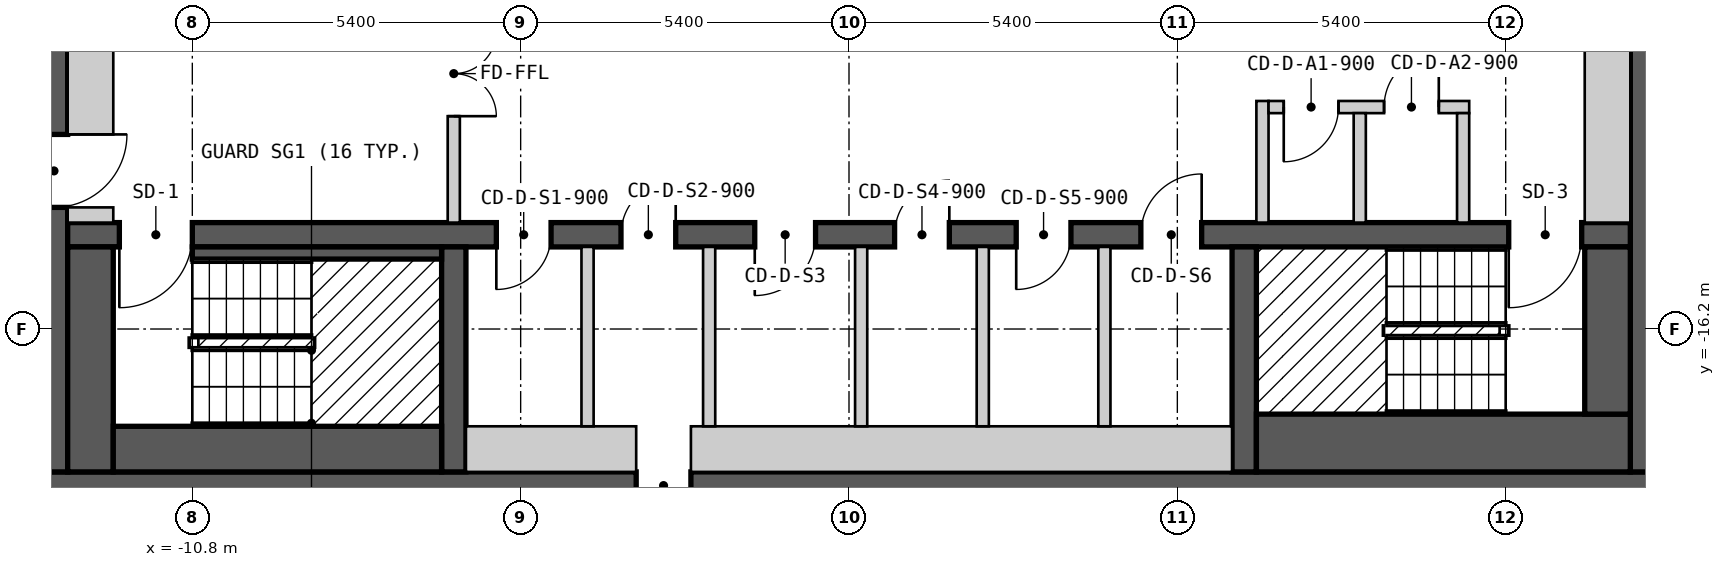
"""IFC4 building model, lengths in metres.
Left out: names, types, materials, properties, quantities, classifications, styles, units other than length and angle.
Written with IfcOpenShell. Run it as: python <this file> out.ifc"""

import sys

from ifc_helpers import new_model, si_unit, direction, frame, frame_2d, origin, place, context, subcontext, project, spatial, polyline, rectangle, outline, extrude, element, fill, save


model = new_model("IFC4")
c1 = context("Model", 3, precision=1e-05, world=origin(), true_north=direction((0.0, 1.0)))
c2 = subcontext(c1, "Body", "Model", "MODEL_VIEW")
j1 = project(units=[si_unit("LENGTHUNIT", "METRE"), si_unit("PLANEANGLEUNIT", "RADIAN")], contexts=[c1])
p1 = place(None, origin())
s1 = spatial("IfcSite", under=j1, at=p1, CompositionType="ELEMENT")
p2 = place(p1, origin())
s2 = spatial("IfcBuilding", under=s1, at=p2, CompositionType="ELEMENT")
p3 = place(p2, frame((0.0, 0.0, 202.8)))
s3 = spatial("IfcBuildingStorey", under=s2, at=p3, CompositionType="ELEMENT", Elevation=202.8)
p4 = place(p3, frame((-13.3, -18.775, 0.0), z_axis=(0.0, 0.0, 1.0), x_axis=(1.0, 0.0, 0.0)))
e1 = element("IfcWall", 1, at=p4, inside=s3, PredefinedType="SHEAR", context=c2, shape_type="SweptSolid", body=[
    extrude(rectangle(XDim=26.6, YDim=0.45, at=frame_2d((13.3, 0.0))), origin(), (0.0, 0.0, 1.0), 2.7),
])
p5 = place(p4, frame((9.8, 0.0, 0.0)))
e2 = element("IfcOpeningElement", 2, at=p5, cuts=e1, PredefinedType="OPENING", context=c2, shape_type="SweptSolid", body=[
    extrude(rectangle(XDim=0.9, YDim=2.1, at=frame_2d((0.45, 1.05))), frame((0.0, 0.235, 0.0), z_axis=(0.0, -1.0, 0.0), x_axis=(1.0, 0.0, 0.0)), (0.0, 0.0, 1.0), 0.47),
])
p6 = place(p3, frame((-13.075, -18.55, 0.0), z_axis=(0.0, 0.0, 1.0), x_axis=(0.0, 1.0, 0.0)))
e3 = element("IfcWall", 3, at=p6, inside=s3, PredefinedType="SHEAR", context=c2, shape_type="SweptSolid", body=[
    extrude(rectangle(XDim=13.1, YDim=0.45, at=frame_2d((6.55, 0.0))), origin(), (0.0, 0.0, 1.0), 2.7),
])
p7 = place(p6, frame((4.35, 0.0, 0.0)))
e4 = element("IfcOpeningElement", 4, at=p7, cuts=e3, PredefinedType="OPENING", context=c2, shape_type="SweptSolid", body=[
    extrude(rectangle(XDim=1.2, YDim=2.1, at=frame_2d((0.6, 1.05))), frame((0.0, 0.235, 0.0), z_axis=(0.0, -1.0, 0.0), x_axis=(1.0, 0.0, 0.0)), (0.0, 0.0, 1.0), 0.47),
])
p8 = place(p3, frame((13.075, -18.55, 0.0), z_axis=(0.0, 0.0, 1.0), x_axis=(0.0, 1.0, 0.0)))
e5 = element("IfcWall", 5, at=p8, inside=s3, PredefinedType="SHEAR", context=c2, shape_type="SweptSolid", body=[
    extrude(rectangle(XDim=13.1, YDim=0.45, at=frame_2d((6.55, 0.0))), origin(), (0.0, 0.0, 1.0), 2.7),
])
p9 = place(p3, frame((-12.85, -14.65, 0.0), z_axis=(0.0, 0.0, 1.0), x_axis=(1.0, 0.0, 0.0)))
e6 = element("IfcWall", 6, at=p9, inside=s3, PredefinedType="SHEAR", context=c2, shape_type="SweptSolid", body=[
    extrude(rectangle(XDim=25.7, YDim=0.4, at=frame_2d((12.85, 0.0))), origin(), (0.0, 0.0, 1.0), 2.7),
])
p10 = place(p9, frame((2.05, 0.0, 0.0), z_axis=(0.0, 0.0, 1.0), x_axis=(-1.0, 0.0, 0.0)))
e7 = element("IfcOpeningElement", 7, at=p10, cuts=e6, PredefinedType="OPENING", context=c2, shape_type="SweptSolid", body=[
    extrude(rectangle(XDim=1.2, YDim=2.1, at=frame_2d((0.6, 1.05))), frame((0.0, 0.21, 0.0), z_axis=(0.0, -1.0, 0.0), x_axis=(1.0, 0.0, 0.0)), (0.0, 0.0, 1.0), 0.42),
])
p11 = place(p9, frame((24.9, 0.0, 0.0), z_axis=(0.0, 0.0, 1.0), x_axis=(-1.0, 0.0, 0.0)))
e8 = element("IfcOpeningElement", 8, at=p11, cuts=e6, PredefinedType="OPENING", context=c2, shape_type="SweptSolid", body=[
    extrude(rectangle(XDim=1.2, YDim=2.1, at=frame_2d((0.6, 1.05))), frame((0.0, 0.21, 0.0), z_axis=(0.0, -1.0, 0.0), x_axis=(1.0, 0.0, 0.0)), (0.0, 0.0, 1.0), 0.42),
])
p12 = place(p9, frame((7.95, 0.0, 0.0), z_axis=(0.0, 0.0, 1.0), x_axis=(-1.0, 0.0, 0.0)))
e9 = element("IfcOpeningElement", 9, at=p12, cuts=e6, PredefinedType="OPENING", context=c2, shape_type="SweptSolid", body=[
    extrude(rectangle(XDim=0.9, YDim=2.1, at=frame_2d((0.45, 1.05))), frame((0.0, 0.21, 0.0), z_axis=(0.0, -1.0, 0.0), x_axis=(1.0, 0.0, 0.0)), (0.0, 0.0, 1.0), 0.42),
])
p13 = place(p9, frame((10.0, 0.0, 0.0), z_axis=(0.0, 0.0, 1.0), x_axis=(-1.0, 0.0, 0.0)))
e10 = element("IfcOpeningElement", 10, at=p13, cuts=e6, PredefinedType="OPENING", context=c2, shape_type="SweptSolid", body=[
    extrude(rectangle(XDim=0.9, YDim=2.1, at=frame_2d((0.45, 1.05))), frame((0.0, 0.21, 0.0), z_axis=(0.0, -1.0, 0.0), x_axis=(1.0, 0.0, 0.0)), (0.0, 0.0, 1.0), 0.42),
])
p14 = place(p9, frame((12.3, 0.0, 0.0), z_axis=(0.0, 0.0, 1.0), x_axis=(-1.0, 0.0, 0.0)))
e11 = element("IfcOpeningElement", 11, at=p14, cuts=e6, PredefinedType="OPENING", context=c2, shape_type="SweptSolid", body=[
    extrude(rectangle(XDim=1.0, YDim=2.1, at=frame_2d((0.5, 1.05))), frame((0.0, 0.21, 0.0), z_axis=(0.0, -1.0, 0.0), x_axis=(1.0, 0.0, 0.0)), (0.0, 0.0, 1.0), 0.42),
])
p15 = place(p9, frame((14.5, 0.0, 0.0), z_axis=(0.0, 0.0, 1.0), x_axis=(-1.0, 0.0, 0.0)))
e12 = element("IfcOpeningElement", 12, at=p15, cuts=e6, PredefinedType="OPENING", context=c2, shape_type="SweptSolid", body=[
    extrude(rectangle(XDim=0.9, YDim=2.1, at=frame_2d((0.45, 1.05))), frame((0.0, 0.21, 0.0), z_axis=(0.0, -1.0, 0.0), x_axis=(1.0, 0.0, 0.0)), (0.0, 0.0, 1.0), 0.42),
])
p16 = place(p9, frame((16.5, 0.0, 0.0), z_axis=(0.0, 0.0, 1.0), x_axis=(-1.0, 0.0, 0.0)))
e13 = element("IfcOpeningElement", 13, at=p16, cuts=e6, PredefinedType="OPENING", context=c2, shape_type="SweptSolid", body=[
    extrude(rectangle(XDim=0.9, YDim=2.1, at=frame_2d((0.45, 1.05))), frame((0.0, 0.21, 0.0), z_axis=(0.0, -1.0, 0.0), x_axis=(1.0, 0.0, 0.0)), (0.0, 0.0, 1.0), 0.42),
])
p17 = place(p9, frame((18.65, 0.0, 0.0), z_axis=(0.0, 0.0, 1.0), x_axis=(-1.0, 0.0, 0.0)))
e14 = element("IfcOpeningElement", 14, at=p17, cuts=e6, PredefinedType="OPENING", context=c2, shape_type="SweptSolid", body=[
    extrude(rectangle(XDim=1.0, YDim=2.1, at=frame_2d((0.5, 1.05))), frame((0.0, 0.21, 0.0), z_axis=(0.0, -1.0, 0.0), x_axis=(1.0, 0.0, 0.0)), (0.0, 0.0, 1.0), 0.42),
])
for number, where, z_axis, x_axis in (
    (15, (-6.5, -18.55, 0.0), (0.0, 0.0, 1.0), (0.0, 1.0, 0.0)),
    (16, (6.5, -18.55, 0.0), (0.0, 0.0, 1.0), (0.0, 1.0, 0.0)),
):
    element("IfcWall", number, at=place(p3, frame(where, z_axis=z_axis, x_axis=x_axis)), inside=s3, PredefinedType="SHEAR", context=c2, shape_type="SweptSolid", body=[
        extrude(rectangle(XDim=3.7, YDim=0.4, at=frame_2d((1.85, 0.0))), origin(), (0.0, 0.0, 1.0), 2.7),
    ])
p18 = place(p3, frame((-15.34, -18.37, 0.0), z_axis=(0.0, 0.0, 1.0), x_axis=(0.866022959057, -0.500004234368, 0.0)))
e17 = element("IfcWall", 17, at=p18, inside=s3, PredefinedType="SOLIDWALL", context=c2, shape_type="SweptSolid", body=[
    extrude(outline(polyline([(0.0, -0.15), (5.0, -0.15), (4.92, 0.15), (0.08, 0.15), (0.0, -0.15)])), origin(), (0.0, 0.0, 1.0), 2.7),
])
p19 = place(p18, frame((0.65, 0.0, 0.15)))
e18 = element("IfcOpeningElement", 18, at=p19, cuts=e17, PredefinedType="OPENING", context=c2, shape_type="SweptSolid", body=[
    extrude(rectangle(XDim=1.2, YDim=2.1, at=frame_2d((0.6, 1.05))), frame((0.0, 0.16, 0.0), z_axis=(0.0, -1.0, 0.0), x_axis=(1.0, 0.0, 0.0)), (0.0, 0.0, 1.0), 0.32),
])
p20 = place(p18, frame((3.15, 0.0, 0.15)))
e19 = element("IfcOpeningElement", 19, at=p20, cuts=e17, PredefinedType="OPENING", context=c2, shape_type="SweptSolid", body=[
    extrude(rectangle(XDim=1.2, YDim=2.1, at=frame_2d((0.6, 1.05))), frame((0.0, 0.16, 0.0), z_axis=(0.0, -1.0, 0.0), x_axis=(1.0, 0.0, 0.0)), (0.0, 0.0, 1.0), 0.32),
])
p21 = place(p3, frame((11.01, -20.87, 0.0), z_axis=(0.0, 0.0, 1.0), x_axis=(0.866022959057, 0.500004234368, 0.0)))
e20 = element("IfcWall", 20, at=p21, inside=s3, PredefinedType="SOLIDWALL", context=c2, shape_type="SweptSolid", body=[
    extrude(outline(polyline([(0.0, -0.15), (5.0, -0.15), (4.92, 0.15), (0.08, 0.15), (0.0, -0.15)])), origin(), (0.0, 0.0, 1.0), 2.7),
])
p22 = place(p21, frame((0.65, 0.0, 0.15)))
e21 = element("IfcOpeningElement", 21, at=p22, cuts=e20, PredefinedType="OPENING", context=c2, shape_type="SweptSolid", body=[
    extrude(rectangle(XDim=1.2, YDim=2.1, at=frame_2d((0.6, 1.05))), frame((0.0, 0.16, 0.0), z_axis=(0.0, -1.0, 0.0), x_axis=(1.0, 0.0, 0.0)), (0.0, 0.0, 1.0), 0.32),
])
p23 = place(p21, frame((3.149, 0.0, 0.15)))
e22 = element("IfcOpeningElement", 22, at=p23, cuts=e20, PredefinedType="OPENING", context=c2, shape_type="SweptSolid", body=[
    extrude(rectangle(XDim=1.2, YDim=2.1, at=frame_2d((0.6, 1.05))), frame((0.0, 0.16, 0.0), z_axis=(0.0, -1.0, 0.0), x_axis=(1.0, 0.0, 0.0)), (0.0, 0.0, 1.0), 0.32),
])
p24 = place(p3, frame((-12.475, -18.55, 0.0), z_axis=(0.0, 0.0, 1.0), x_axis=(0.0, 1.0, 0.0)))
e23 = element("IfcWall", 23, at=p24, inside=s3, PredefinedType="SOLIDWALL", context=c2, shape_type="SweptSolid", body=[
    extrude(rectangle(XDim=3.7, YDim=0.75, at=frame_2d((1.85, 0.0))), origin(), (0.0, 0.0, 1.0), 2.7),
])
p25 = place(p3, frame((-12.85, -14.325, 0.0), z_axis=(0.0, 0.0, 1.0), x_axis=(1.0, 0.0, 0.0)))
e24 = element("IfcWall", 24, at=p25, inside=s3, PredefinedType="PARTITIONING", context=c2, shape_type="SweptSolid", body=[
    extrude(rectangle(XDim=0.75, YDim=0.25, at=frame_2d((0.375, 0.0))), origin(), (0.0, 0.0, 1.0), 2.7),
])
p26 = place(p3, frame((-12.475, -13.0, 0.0), z_axis=(0.0, 0.0, 1.0), x_axis=(0.0, 1.0, 0.0)))
e25 = element("IfcWall", 25, at=p26, inside=s3, PredefinedType="PARTITIONING", context=c2, shape_type="SweptSolid", body=[
    extrude(rectangle(XDim=3.45, YDim=0.75, at=frame_2d((1.725, 0.0))), origin(), (0.0, 0.0, 1.0), 2.7),
])
p27 = place(p3, frame((-12.1, -18.175, 0.0), z_axis=(0.0, 0.0, 1.0), x_axis=(1.0, 0.0, 0.0)))
e26 = element("IfcWall", 26, at=p27, inside=s3, PredefinedType="SOLIDWALL", context=c2, shape_type="SweptSolid", body=[
    extrude(rectangle(XDim=5.4, YDim=0.75, at=frame_2d((2.7, 0.0))), origin(), (0.0, 0.0, 1.0), 2.7),
])
p28 = place(p3, frame((-10.8, -14.95, 0.0), z_axis=(0.0, 0.0, 1.0), x_axis=(1.0, 0.0, 0.0)))
e27 = element("IfcWall", 27, at=p28, inside=s3, PredefinedType="SOLIDWALL", context=c2, shape_type="SweptSolid", body=[
    extrude(rectangle(XDim=4.1, YDim=0.2, at=frame_2d((2.05, 0.0))), origin(), (0.0, 0.0, 1.0), 2.7),
])
p29 = place(p3, frame((-6.5, -14.45, 0.0), z_axis=(0.0, 0.0, 1.0), x_axis=(0.0, 1.0, 0.0)))
e28 = element("IfcWall", 28, at=p29, inside=s3, PredefinedType="PARTITIONING", context=c2, shape_type="SweptSolid", body=[
    extrude(rectangle(XDim=4.9, YDim=0.2, at=frame_2d((2.45, 0.0))), origin(), (0.0, 0.0, 1.0), 2.7),
])
p30 = place(p29, frame((3.15, 0.0, 0.0), z_axis=(0.0, 0.0, 1.0), x_axis=(-1.0, 0.0, 0.0)))
e29 = element("IfcOpeningElement", 29, at=p30, cuts=e28, PredefinedType="OPENING", context=c2, shape_type="SweptSolid", body=[
    extrude(rectangle(XDim=1.4, YDim=2.1, at=frame_2d((0.7, 1.05))), frame((0.0, 0.11, 0.0), z_axis=(0.0, -1.0, 0.0), x_axis=(1.0, 0.0, 0.0)), (0.0, 0.0, 1.0), 0.22),
])
p31 = place(p3, frame((-6.3, -18.175, 0.0), z_axis=(0.0, 0.0, 1.0), x_axis=(1.0, 0.0, 0.0)))
e30 = element("IfcWall", 30, at=p31, inside=s3, PredefinedType="PARTITIONING", context=c2, shape_type="SweptSolid", body=[
    extrude(rectangle(XDim=2.8, YDim=0.75, at=frame_2d((1.4, 0.0))), origin(), (0.0, 0.0, 1.0), 2.7),
])
p32 = place(p3, frame((-4.3, -17.8, 0.0), z_axis=(0.0, 0.0, 1.0), x_axis=(0.0, 1.0, 0.0)))
e31 = element("IfcWall", 31, at=p32, inside=s3, PredefinedType="PARTITIONING", context=c2, shape_type="SweptSolid", body=[
    extrude(rectangle(XDim=2.95, YDim=0.2, at=frame_2d((1.475, 0.0))), origin(), (0.0, 0.0, 1.0), 2.7),
])
p33 = place(p3, frame((-2.6, -18.175, 0.0), z_axis=(0.0, 0.0, 1.0), x_axis=(1.0, 0.0, 0.0)))
e32 = element("IfcWall", 32, at=p33, inside=s3, PredefinedType="PARTITIONING", context=c2, shape_type="SweptSolid", body=[
    extrude(rectangle(XDim=8.9, YDim=0.75, at=frame_2d((4.45, 0.0))), origin(), (0.0, 0.0, 1.0), 2.7),
])
for number, where, z_axis, x_axis in (
    (33, (-2.3, -17.8, 0.0), (0.0, 0.0, 1.0), (0.0, 1.0, 0.0)),
    (34, (0.2, -17.8, 0.0), (0.0, 0.0, 1.0), (0.0, 1.0, 0.0)),
    (35, (2.2, -17.8, 0.0), (0.0, 0.0, 1.0), (0.0, 1.0, 0.0)),
    (36, (4.2, -17.8, 0.0), (0.0, 0.0, 1.0), (0.0, 1.0, 0.0)),
):
    element("IfcWall", number, at=place(p3, frame(where, z_axis=z_axis, x_axis=x_axis)), inside=s3, PredefinedType="PARTITIONING", context=c2, shape_type="SweptSolid", body=[
        extrude(rectangle(XDim=2.95, YDim=0.2, at=frame_2d((1.475, 0.0))), origin(), (0.0, 0.0, 1.0), 2.7),
    ])
p34 = place(p3, frame((6.7, -18.075, 0.0), z_axis=(0.0, 0.0, 1.0), x_axis=(1.0, 0.0, 0.0)))
e37 = element("IfcWall", 37, at=p34, inside=s3, PredefinedType="SOLIDWALL", context=c2, shape_type="SweptSolid", body=[
    extrude(rectangle(XDim=6.15, YDim=0.95, at=frame_2d((3.075, 0.0))), origin(), (0.0, 0.0, 1.0), 2.7),
])
p35 = place(p3, frame((6.8, -14.45, 0.0), z_axis=(0.0, 0.0, 1.0), x_axis=(0.0, 1.0, 0.0)))
e38 = element("IfcWall", 38, at=p35, inside=s3, PredefinedType="PARTITIONING", context=c2, shape_type="SweptSolid", body=[
    extrude(rectangle(XDim=2.0, YDim=0.2, at=frame_2d((1.0, 0.0))), origin(), (0.0, 0.0, 1.0), 2.7),
])
p36 = place(p3, frame((6.9, -12.55, 0.0), z_axis=(0.0, 0.0, 1.0), x_axis=(1.0, 0.0, 0.0)))
e39 = element("IfcWall", 39, at=p36, inside=s3, PredefinedType="PARTITIONING", context=c2, shape_type="SweptSolid", body=[
    extrude(rectangle(XDim=3.3, YDim=0.2, at=frame_2d((1.65, 0.0))), origin(), (0.0, 0.0, 1.0), 2.7),
])
p37 = place(p36, frame((1.15, 0.0, 0.0), z_axis=(0.0, 0.0, 1.0), x_axis=(-1.0, 0.0, 0.0)))
e40 = element("IfcOpeningElement", 40, at=p37, cuts=e39, PredefinedType="OPENING", context=c2, shape_type="SweptSolid", body=[
    extrude(rectangle(XDim=0.9, YDim=2.1, at=frame_2d((0.45, 1.05))), frame((0.0, 0.11, 0.0), z_axis=(0.0, -1.0, 0.0), x_axis=(1.0, 0.0, 0.0)), (0.0, 0.0, 1.0), 0.22),
])
p38 = place(p36, frame((2.8, 0.0, 0.0), z_axis=(0.0, 0.0, 1.0), x_axis=(-1.0, 0.0, 0.0)))
e41 = element("IfcOpeningElement", 41, at=p38, cuts=e39, PredefinedType="OPENING", context=c2, shape_type="SweptSolid", body=[
    extrude(rectangle(XDim=0.9, YDim=2.1, at=frame_2d((0.45, 1.05))), frame((0.0, 0.11, 0.0), z_axis=(0.0, -1.0, 0.0), x_axis=(1.0, 0.0, 0.0)), (0.0, 0.0, 1.0), 0.22),
])
for number, where, z_axis, x_axis in (
    (42, (8.4, -14.45, 0.0), (0.0, 0.0, 1.0), (0.0, 1.0, 0.0)),
    (43, (10.1, -14.45, 0.0), (0.0, 0.0, 1.0), (0.0, 1.0, 0.0)),
):
    element("IfcWall", number, at=place(p3, frame(where, z_axis=z_axis, x_axis=x_axis)), inside=s3, PredefinedType="PARTITIONING", context=c2, shape_type="SweptSolid", body=[
        extrude(rectangle(XDim=1.8, YDim=0.2, at=frame_2d((0.9, 0.0))), origin(), (0.0, 0.0, 1.0), 2.7),
    ])
p39 = place(p3, frame((12.475, -17.6, 0.0), z_axis=(0.0, 0.0, 1.0), x_axis=(0.0, 1.0, 0.0)))
e44 = element("IfcWall", 44, at=p39, inside=s3, PredefinedType="SOLIDWALL", context=c2, shape_type="SweptSolid", body=[
    extrude(rectangle(XDim=2.75, YDim=0.75, at=frame_2d((1.375, 0.0))), origin(), (0.0, 0.0, 1.0), 2.7),
])
p40 = place(p3, frame((12.475, -14.45, 0.0), z_axis=(0.0, 0.0, 1.0), x_axis=(0.0, 1.0, 0.0)))
e45 = element("IfcWall", 45, at=p40, inside=s3, PredefinedType="PARTITIONING", context=c2, shape_type="SweptSolid", body=[
    extrude(rectangle(XDim=8.25, YDim=0.75, at=frame_2d((4.125, 0.0))), origin(), (0.0, 0.0, 1.0), 2.7),
])
p41 = place(p10, origin())
e46 = element("IfcDoor", 46, at=p41, inside=s3, OperationType="SINGLE_SWING_RIGHT", PredefinedType="DOOR", context=c2, shape_type="SweptSolid", body=[
    extrude(rectangle(XDim=1.2, YDim=2.1, at=frame_2d((0.6, 1.05))), frame((0.0, 0.025, 0.0), z_axis=(0.0, -1.0, 0.0), x_axis=(1.0, 0.0, 0.0)), (0.0, 0.0, 1.0), 0.05),
])
fill(e7, e46)
p42 = place(p11, origin())
e47 = element("IfcDoor", 47, at=p42, inside=s3, OperationType="SINGLE_SWING_RIGHT", PredefinedType="DOOR", context=c2, shape_type="SweptSolid", body=[
    extrude(rectangle(XDim=1.2, YDim=2.1, at=frame_2d((0.6, 1.05))), frame((0.0, 0.025, 0.0), z_axis=(0.0, -1.0, 0.0), x_axis=(1.0, 0.0, 0.0)), (0.0, 0.0, 1.0), 0.05),
])
fill(e8, e47)
p43 = place(p7, origin())
e48 = element("IfcDoor", 48, at=p43, inside=s3, OperationType="SINGLE_SWING_RIGHT", PredefinedType="DOOR", context=c2, shape_type="SweptSolid", body=[
    extrude(rectangle(XDim=1.2, YDim=2.1, at=frame_2d((0.6, 1.05))), frame((0.0, 0.025, 0.0), z_axis=(0.0, -1.0, 0.0), x_axis=(1.0, 0.0, 0.0)), (0.0, 0.0, 1.0), 0.05),
])
fill(e4, e48)
p44 = place(p30, origin())
e49 = element("IfcDoor", 49, at=p44, inside=s3, OperationType="DOUBLE_DOOR_SINGLE_SWING", PredefinedType="DOOR", context=c2, shape_type="SweptSolid", body=[
    extrude(rectangle(XDim=1.4, YDim=2.1, at=frame_2d((0.7, 1.05))), frame((0.0, 0.025, 0.0), z_axis=(0.0, -1.0, 0.0), x_axis=(1.0, 0.0, 0.0)), (0.0, 0.0, 1.0), 0.05),
])
fill(e29, e49)
p45 = place(p37, origin())
e50 = element("IfcDoor", 50, at=p45, inside=s3, OperationType="SINGLE_SWING_RIGHT", PredefinedType="DOOR", context=c2, shape_type="SweptSolid", body=[
    extrude(rectangle(XDim=0.9, YDim=2.1, at=frame_2d((0.45, 1.05))), frame((0.0, 0.025, 0.0), z_axis=(0.0, -1.0, 0.0), x_axis=(1.0, 0.0, 0.0)), (0.0, 0.0, 1.0), 0.05),
])
fill(e40, e50)
p46 = place(p38, origin())
e51 = element("IfcDoor", 51, at=p46, inside=s3, OperationType="SINGLE_SWING_LEFT", PredefinedType="DOOR", context=c2, shape_type="SweptSolid", body=[
    extrude(rectangle(XDim=0.9, YDim=2.1, at=frame_2d((0.45, 1.05))), frame((0.0, 0.025, 0.0), z_axis=(0.0, -1.0, 0.0), x_axis=(1.0, 0.0, 0.0)), (0.0, 0.0, 1.0), 0.05),
])
fill(e41, e51)
p47 = place(p12, origin())
e52 = element("IfcDoor", 52, at=p47, inside=s3, OperationType="SINGLE_SWING_RIGHT", PredefinedType="DOOR", context=c2, shape_type="SweptSolid", body=[
    extrude(rectangle(XDim=0.9, YDim=2.1, at=frame_2d((0.45, 1.05))), frame((0.0, 0.025, 0.0), z_axis=(0.0, -1.0, 0.0), x_axis=(1.0, 0.0, 0.0)), (0.0, 0.0, 1.0), 0.05),
])
fill(e9, e52)
p48 = place(p13, origin())
e53 = element("IfcDoor", 53, at=p48, inside=s3, OperationType="SINGLE_SWING_LEFT", PredefinedType="DOOR", context=c2, shape_type="SweptSolid", body=[
    extrude(rectangle(XDim=0.9, YDim=2.1, at=frame_2d((0.45, 1.05))), frame((0.0, 0.025, 0.0), z_axis=(0.0, -1.0, 0.0), x_axis=(1.0, 0.0, 0.0)), (0.0, 0.0, 1.0), 0.05),
])
fill(e10, e53)
p49 = place(p14, origin())
e54 = element("IfcDoor", 54, at=p49, inside=s3, OperationType="SINGLE_SWING_RIGHT", PredefinedType="DOOR", context=c2, shape_type="SweptSolid", body=[
    extrude(rectangle(XDim=1.0, YDim=2.1, at=frame_2d((0.5, 1.05))), frame((0.0, 0.025, 0.0), z_axis=(0.0, -1.0, 0.0), x_axis=(1.0, 0.0, 0.0)), (0.0, 0.0, 1.0), 0.05),
])
fill(e11, e54)
p50 = place(p15, origin())
e55 = element("IfcDoor", 55, at=p50, inside=s3, OperationType="SINGLE_SWING_LEFT", PredefinedType="DOOR", context=c2, shape_type="SweptSolid", body=[
    extrude(rectangle(XDim=0.9, YDim=2.1, at=frame_2d((0.45, 1.05))), frame((0.0, 0.025, 0.0), z_axis=(0.0, -1.0, 0.0), x_axis=(1.0, 0.0, 0.0)), (0.0, 0.0, 1.0), 0.05),
])
fill(e12, e55)
p51 = place(p16, origin())
e56 = element("IfcDoor", 56, at=p51, inside=s3, OperationType="SINGLE_SWING_RIGHT", PredefinedType="DOOR", context=c2, shape_type="SweptSolid", body=[
    extrude(rectangle(XDim=0.9, YDim=2.1, at=frame_2d((0.45, 1.05))), frame((0.0, 0.025, 0.0), z_axis=(0.0, -1.0, 0.0), x_axis=(1.0, 0.0, 0.0)), (0.0, 0.0, 1.0), 0.05),
])
fill(e13, e56)
p52 = place(p17, origin())
e57 = element("IfcDoor", 57, at=p52, inside=s3, OperationType="SINGLE_SWING_LEFT", PredefinedType="DOOR", context=c2, shape_type="SweptSolid", body=[
    extrude(rectangle(XDim=1.0, YDim=2.1, at=frame_2d((0.5, 1.05))), frame((0.0, 0.025, 0.0), z_axis=(0.0, -1.0, 0.0), x_axis=(1.0, 0.0, 0.0)), (0.0, 0.0, 1.0), 0.05),
])
fill(e14, e57)
p53 = place(p5, origin())
e58 = element("IfcDoor", 58, at=p53, inside=s3, OperationType="SINGLE_SWING_RIGHT", PredefinedType="DOOR", context=c2, shape_type="SweptSolid", body=[
    extrude(rectangle(XDim=0.9, YDim=2.1, at=frame_2d((0.45, 1.05))), frame((0.0, 0.025, 0.0), z_axis=(0.0, -1.0, 0.0), x_axis=(1.0, 0.0, 0.0)), (0.0, 0.0, 1.0), 0.05),
])
fill(e2, e58)
save(model, sys.argv[1])
